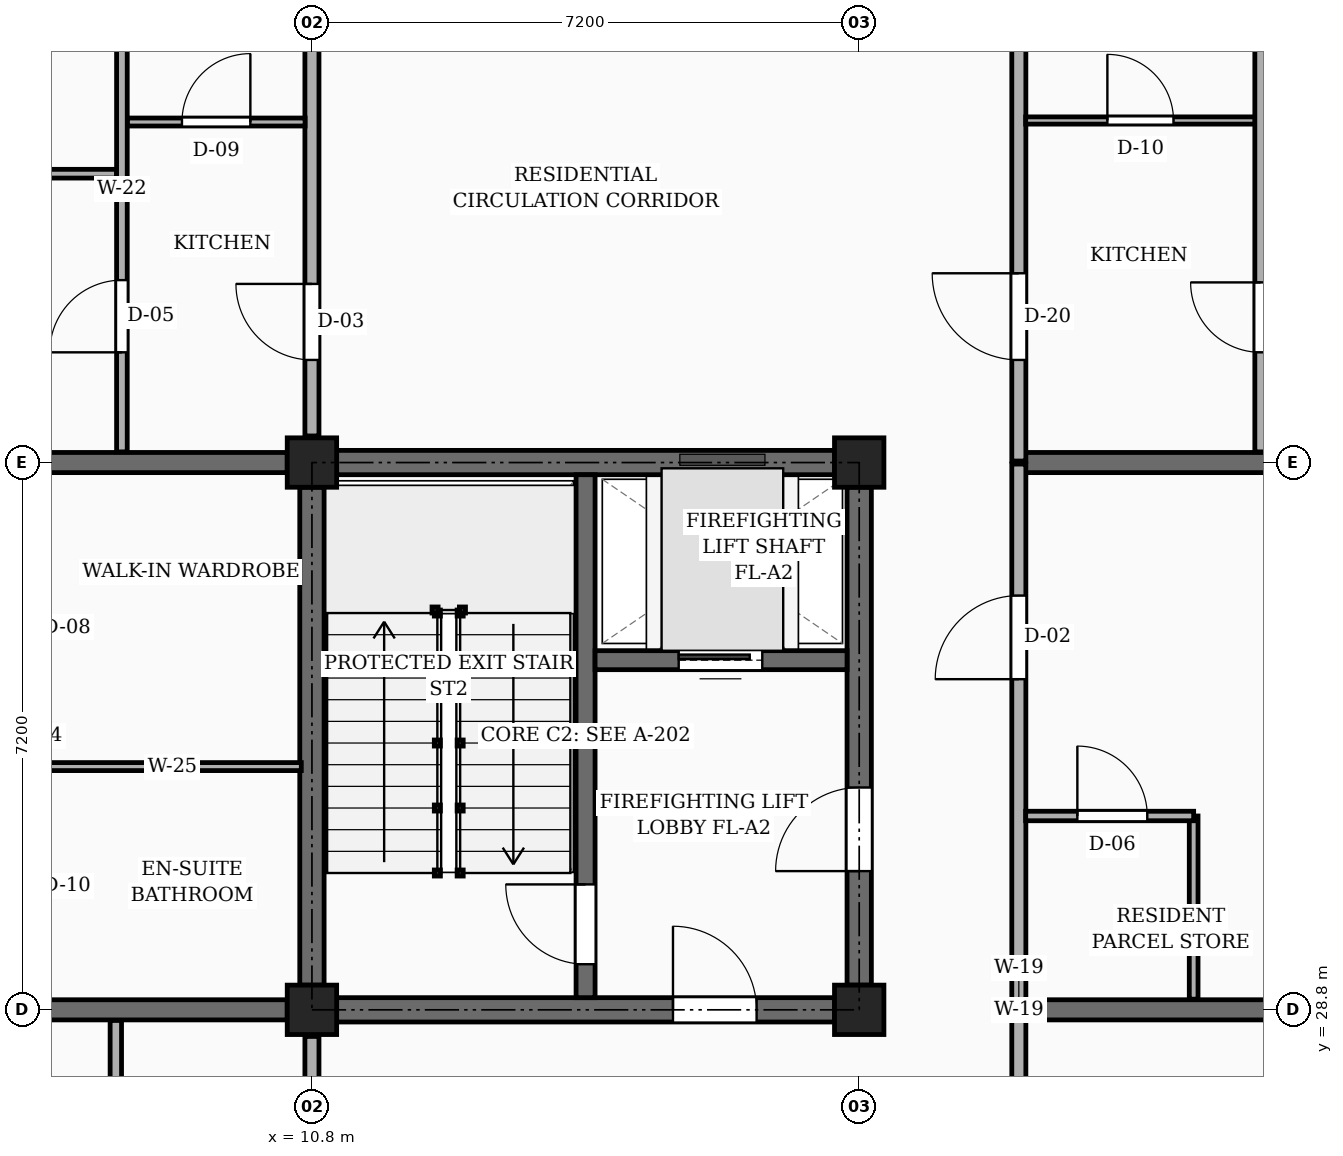
"""IFC4 building model, lengths in metres.
Left out: names, types, materials, properties, quantities, classifications, styles, units other than length and angle.
Written with IfcOpenShell. Run it as: python <this file> out.ifc"""

import sys

from ifc_helpers import new_model, si_unit, direction, frame, frame_2d, origin, origin_2d, place, context, subcontext, project, spatial, rectangle, extrude, element, fill, save


model = new_model("IFC4")
c1 = context("Model", 3, precision=1e-05, world=origin(), true_north=direction((0.0, 1.0)))
c2 = subcontext(c1, "Body", "Model", "MODEL_VIEW")
j1 = project(units=[si_unit("LENGTHUNIT", "METRE"), si_unit("PLANEANGLEUNIT", "RADIAN")], contexts=[c1])
p1 = place(None, origin())
s1 = spatial("IfcSite", under=j1, at=p1, CompositionType="ELEMENT")
p2 = place(p1, origin())
s2 = spatial("IfcBuilding", under=s1, at=p2, CompositionType="ELEMENT")
p3 = place(p2, origin())
s3 = spatial("IfcBuildingStorey", under=s2, at=p3, CompositionType="ELEMENT", Elevation=0.0)
for number, where, z_axis, x_axis in (
    (1, (10.8, 28.8, 0.0), (0.0, 0.0, 1.0), (1.0, 0.0, 0.0)),
    (2, (10.8, 36.0, 0.0), (0.0, 0.0, 1.0), (1.0, 0.0, 0.0)),
    (3, (18.0, 28.8, 0.0), (0.0, 0.0, 1.0), (1.0, 0.0, 0.0)),
    (4, (18.0, 36.0, 0.0), (0.0, 0.0, 1.0), (1.0, 0.0, 0.0)),
):
    element("IfcColumn", number, at=place(p3, frame(where, z_axis=z_axis, x_axis=x_axis)), inside=s3, PredefinedType="COLUMN", context=c2, shape_type="SweptSolid", body=[
        extrude(rectangle(XDim=0.65, YDim=0.65, at=origin_2d()), origin(), (0.0, 0.0, 1.0), 4.5),
    ])
p4 = place(p3, frame((3.9, 28.8, 0.0), z_axis=(0.0, 0.0, 1.0), x_axis=(1.0, 0.0, 0.0)))
e5 = element("IfcWall", 5, at=p4, inside=s3, PredefinedType="SOLIDWALL", context=c2, shape_type="SweptSolid", body=[
    extrude(rectangle(XDim=6.575, YDim=0.265, at=frame_2d((3.288, 0.0))), origin(), (0.0, 0.0, 1.0), 3.52),
])
p5 = place(p4, frame((1.35, 0.0, 0.0)))
e6 = element("IfcOpeningElement", 6, at=p5, cuts=e5, PredefinedType="OPENING", context=c2, shape_type="SweptSolid", body=[
    extrude(rectangle(XDim=0.98, YDim=2.12, at=frame_2d((0.49, 1.06))), frame((0.0, 0.143, 0.0), z_axis=(0.0, -1.0, 0.0), x_axis=(1.0, 0.0, 0.0)), (0.0, 0.0, 1.0), 0.285),
])
p6 = place(p3, frame((20.1, 28.8, 0.0), z_axis=(0.0, 0.0, 1.0), x_axis=(1.0, 0.0, 0.0)))
e7 = element("IfcWall", 7, at=p6, inside=s3, PredefinedType="SOLIDWALL", context=c2, shape_type="SweptSolid", body=[
    extrude(rectangle(XDim=12.0, YDim=0.265, at=frame_2d((6.0, 0.0))), origin(), (0.0, 0.0, 1.0), 3.52),
])
p7 = place(p3, frame((3.9, 36.0, 0.0), z_axis=(0.0, 0.0, 1.0), x_axis=(1.0, 0.0, 0.0)))
e8 = element("IfcWall", 8, at=p7, inside=s3, PredefinedType="SOLIDWALL", context=c2, shape_type="SweptSolid", body=[
    extrude(rectangle(XDim=6.575, YDim=0.265, at=frame_2d((3.288, 0.0))), origin(), (0.0, 0.0, 1.0), 3.52),
])
p8 = place(p3, frame((20.1, 36.0, 0.0), z_axis=(0.0, 0.0, 1.0), x_axis=(1.0, 0.0, 0.0)))
e9 = element("IfcWall", 9, at=p8, inside=s3, PredefinedType="SOLIDWALL", context=c2, shape_type="SweptSolid", body=[
    extrude(rectangle(XDim=12.0, YDim=0.265, at=frame_2d((6.0, 0.0))), origin(), (0.0, 0.0, 1.0), 3.52),
])
for number, where, z_axis, x_axis in (
    (10, (10.8, 29.125, 0.0), (0.0, 0.0, 1.0), (0.0, 1.0, 0.0)),
    (11, (11.125, 36.0, 0.0), (0.0, 0.0, 1.0), (1.0, 0.0, 0.0)),
):
    element("IfcWall", number, at=place(p3, frame(where, z_axis=z_axis, x_axis=x_axis)), inside=s3, PredefinedType="SHEAR", context=c2, shape_type="SweptSolid", body=[
        extrude(rectangle(XDim=6.55, YDim=0.32, at=frame_2d((3.275, 0.0))), origin(), (0.0, 0.0, 1.0), 4.22),
    ])
p9 = place(p3, frame((18.0, 29.125, 0.0), z_axis=(0.0, 0.0, 1.0), x_axis=(0.0, 1.0, 0.0)))
e12 = element("IfcWall", 12, at=p9, inside=s3, PredefinedType="SHEAR", context=c2, shape_type="SweptSolid", body=[
    extrude(rectangle(XDim=6.55, YDim=0.32, at=frame_2d((3.275, 0.0))), origin(), (0.0, 0.0, 1.0), 4.22),
])
p10 = place(p9, frame((1.5, 0.0, 0.0)))
e13 = element("IfcOpeningElement", 13, at=p10, cuts=e12, PredefinedType="OPENING", context=c2, shape_type="SweptSolid", body=[
    extrude(rectangle(XDim=1.1, YDim=2.15, at=frame_2d((0.55, 1.075))), frame((0.0, 0.17, 0.0), z_axis=(0.0, -1.0, 0.0), x_axis=(1.0, 0.0, 0.0)), (0.0, 0.0, 1.0), 0.34),
])
p11 = place(p3, frame((11.125, 28.8, 0.0), z_axis=(0.0, 0.0, 1.0), x_axis=(1.0, 0.0, 0.0)))
e14 = element("IfcWall", 14, at=p11, inside=s3, PredefinedType="SHEAR", context=c2, shape_type="SweptSolid", body=[
    extrude(rectangle(XDim=6.55, YDim=0.32, at=frame_2d((3.275, 0.0))), origin(), (0.0, 0.0, 1.0), 4.22),
])
p12 = place(p11, frame((4.425, 0.0, 0.0)))
e15 = element("IfcOpeningElement", 15, at=p12, cuts=e14, PredefinedType="OPENING", context=c2, shape_type="SweptSolid", body=[
    extrude(rectangle(XDim=1.1, YDim=2.15, at=frame_2d((0.55, 1.075))), frame((0.0, 0.17, 0.0), z_axis=(0.0, -1.0, 0.0), x_axis=(1.0, 0.0, 0.0)), (0.0, 0.0, 1.0), 0.34),
])
p13 = place(p3, frame((14.4, 28.96, 0.0), z_axis=(0.0, 0.0, 1.0), x_axis=(0.0, 1.0, 0.0)))
e16 = element("IfcWall", 16, at=p13, inside=s3, PredefinedType="SHEAR", context=c2, shape_type="SweptSolid", body=[
    extrude(rectangle(XDim=6.88, YDim=0.25, at=frame_2d((3.44, 0.0))), origin(), (0.0, 0.0, 1.0), 4.22),
])
p14 = place(p13, frame((0.44, 0.0, 0.0)))
e17 = element("IfcOpeningElement", 17, at=p14, cuts=e16, PredefinedType="OPENING", context=c2, shape_type="SweptSolid", body=[
    extrude(rectangle(XDim=1.05, YDim=2.15, at=frame_2d((0.525, 1.075))), frame((0.0, 0.135, 0.0), z_axis=(0.0, -1.0, 0.0), x_axis=(1.0, 0.0, 0.0)), (0.0, 0.0, 1.0), 0.27),
])
p15 = place(p3, frame((14.525, 33.4, 0.0), z_axis=(0.0, 0.0, 1.0), x_axis=(1.0, 0.0, 0.0)))
e18 = element("IfcWall", 18, at=p15, inside=s3, PredefinedType="SHEAR", context=c2, shape_type="SweptSolid", body=[
    extrude(rectangle(XDim=3.315, YDim=0.25, at=frame_2d((1.658, 0.0))), origin(), (0.0, 0.0, 1.0), 4.22),
])
p16 = place(p15, frame((1.1, 0.0, 0.0)))
e19 = element("IfcOpeningElement", 19, at=p16, cuts=e18, PredefinedType="OPENING", context=c2, shape_type="SweptSolid", body=[
    extrude(rectangle(XDim=1.1, YDim=2.2, at=frame_2d((0.55, 1.1))), frame((0.0, 0.135, 0.0), z_axis=(0.0, -1.0, 0.0), x_axis=(1.0, 0.0, 0.0)), (0.0, 0.0, 1.0), 0.27),
])
p17 = place(p3, frame((20.1, 21.62, 0.0), z_axis=(0.0, 0.0, 1.0), x_axis=(0.0, 1.0, 0.0)))
e20 = element("IfcWall", 20, at=p17, inside=s3, PredefinedType="PARTITIONING", context=c2, shape_type="SweptSolid", body=[
    extrude(rectangle(XDim=7.16, YDim=0.185, at=frame_2d((3.58, 0.0))), origin(), (0.0, 0.0, 1.0), 3.655),
])
p18 = place(p17, frame((1.78, 0.0, 0.0)))
e21 = element("IfcOpeningElement", 21, at=p18, cuts=e20, PredefinedType="OPENING", context=c2, shape_type="SweptSolid", body=[
    extrude(rectangle(XDim=1.1, YDim=2.15, at=frame_2d((0.55, 1.075))), frame((0.0, 0.103, 0.0), z_axis=(0.0, -1.0, 0.0), x_axis=(1.0, 0.0, 0.0)), (0.0, 0.0, 1.0), 0.205),
])
p19 = place(p3, frame((20.1, 28.82, 0.0), z_axis=(0.0, 0.0, 1.0), x_axis=(0.0, 1.0, 0.0)))
e22 = element("IfcWall", 22, at=p19, inside=s3, PredefinedType="PARTITIONING", context=c2, shape_type="SweptSolid", body=[
    extrude(rectangle(XDim=7.16, YDim=0.185, at=frame_2d((3.58, 0.0))), origin(), (0.0, 0.0, 1.0), 3.655),
])
p20 = place(p19, frame((4.33, 0.0, 0.0)))
e23 = element("IfcOpeningElement", 23, at=p20, cuts=e22, PredefinedType="OPENING", context=c2, shape_type="SweptSolid", body=[
    extrude(rectangle(XDim=1.1, YDim=2.15, at=frame_2d((0.55, 1.075))), frame((0.0, 0.103, 0.0), z_axis=(0.0, -1.0, 0.0), x_axis=(1.0, 0.0, 0.0)), (0.0, 0.0, 1.0), 0.205),
])
p21 = place(p3, frame((20.1, 36.02, 0.0), z_axis=(0.0, 0.0, 1.0), x_axis=(0.0, 1.0, 0.0)))
e24 = element("IfcWall", 24, at=p21, inside=s3, PredefinedType="PARTITIONING", context=c2, shape_type="SweptSolid", body=[
    extrude(rectangle(XDim=7.16, YDim=0.185, at=frame_2d((3.58, 0.0))), origin(), (0.0, 0.0, 1.0), 3.655),
])
p22 = place(p21, frame((1.33, 0.0, 0.0)))
e25 = element("IfcOpeningElement", 25, at=p22, cuts=e24, PredefinedType="OPENING", context=c2, shape_type="SweptSolid", body=[
    extrude(rectangle(XDim=1.14, YDim=2.18, at=frame_2d((0.57, 1.09))), frame((0.0, 0.103, 0.0), z_axis=(0.0, -1.0, 0.0), x_axis=(1.0, 0.0, 0.0)), (0.0, 0.0, 1.0), 0.205),
])
p23 = place(p3, frame((10.8, 21.95, 0.0), z_axis=(0.0, 0.0, 1.0), x_axis=(0.0, 1.0, 0.0)))
e26 = element("IfcWall", 26, at=p23, inside=s3, PredefinedType="PARTITIONING", context=c2, shape_type="SweptSolid", body=[
    extrude(rectangle(XDim=6.5, YDim=0.185, at=frame_2d((3.25, 0.0))), origin(), (0.0, 0.0, 1.0), 3.47),
])
p24 = place(p23, frame((1.0, 0.0, 0.0)))
e27 = element("IfcOpeningElement", 27, at=p24, cuts=e26, PredefinedType="OPENING", context=c2, shape_type="SweptSolid", body=[
    extrude(rectangle(XDim=1.14, YDim=2.18, at=frame_2d((0.57, 1.09))), frame((0.0, 0.103, 0.0), z_axis=(0.0, -1.0, 0.0), x_axis=(1.0, 0.0, 0.0)), (0.0, 0.0, 1.0), 0.205),
])
p25 = place(p3, frame((10.8, 36.35, 0.0), z_axis=(0.0, 0.0, 1.0), x_axis=(0.0, 1.0, 0.0)))
e28 = element("IfcWall", 28, at=p25, inside=s3, PredefinedType="PARTITIONING", context=c2, shape_type="SweptSolid", body=[
    extrude(rectangle(XDim=6.5, YDim=0.185, at=frame_2d((3.25, 0.0))), origin(), (0.0, 0.0, 1.0), 3.47),
])
p26 = place(p25, frame((1.0, 0.0, 0.0)))
e29 = element("IfcOpeningElement", 29, at=p26, cuts=e28, PredefinedType="OPENING", context=c2, shape_type="SweptSolid", body=[
    extrude(rectangle(XDim=1.0, YDim=2.15, at=frame_2d((0.5, 1.075))), frame((0.0, 0.103, 0.0), z_axis=(0.0, -1.0, 0.0), x_axis=(1.0, 0.0, 0.0)), (0.0, 0.0, 1.0), 0.205),
])
p27 = place(p3, frame((8.22, 21.74, 0.0), z_axis=(0.0, 0.0, 1.0), x_axis=(0.0, 1.0, 0.0)))
e30 = element("IfcWall", 30, at=p27, inside=s3, PredefinedType="PARTITIONING", context=c2, shape_type="SweptSolid", body=[
    extrude(rectangle(XDim=6.92, YDim=0.15, at=frame_2d((3.46, 0.0))), origin(), (0.0, 0.0, 1.0), 3.655),
])
p28 = place(p27, frame((1.31, 0.0, 0.0)))
e31 = element("IfcOpeningElement", 31, at=p28, cuts=e30, PredefinedType="OPENING", context=c2, shape_type="SweptSolid", body=[
    extrude(rectangle(XDim=0.95, YDim=2.1, at=frame_2d((0.475, 1.05))), frame((0.0, 0.085, 0.0), z_axis=(0.0, -1.0, 0.0), x_axis=(1.0, 0.0, 0.0)), (0.0, 0.0, 1.0), 0.17),
])
p29 = place(p3, frame((7.27, 32.0, 0.0), z_axis=(0.0, 0.0, 1.0), x_axis=(1.0, 0.0, 0.0)))
e32 = element("IfcWall", 32, at=p29, inside=s3, PredefinedType="PARTITIONING", context=c2, shape_type="SweptSolid", body=[
    extrude(rectangle(XDim=3.39, YDim=0.105, at=frame_2d((1.695, 0.0))), origin(), (0.0, 0.0, 1.0), 3.655),
])
p30 = place(p3, frame((22.4, 28.94, 0.0), z_axis=(0.0, 0.0, 1.0), x_axis=(0.0, 1.0, 0.0)))
e33 = element("IfcWall", 33, at=p30, inside=s3, PredefinedType="PARTITIONING", context=c2, shape_type="SweptSolid", body=[
    extrude(rectangle(XDim=2.41, YDim=0.115, at=frame_2d((1.205, 0.0))), origin(), (0.0, 0.0, 1.0), 3.655),
])
p31 = place(p3, frame((20.19, 31.35, 0.0), z_axis=(0.0, 0.0, 1.0), x_axis=(1.0, 0.0, 0.0)))
e34 = element("IfcWall", 34, at=p31, inside=s3, PredefinedType="PARTITIONING", context=c2, shape_type="SweptSolid", body=[
    extrude(rectangle(XDim=2.21, YDim=0.125, at=frame_2d((1.105, 0.0))), origin(), (0.0, 0.0, 1.0), 3.655),
])
p32 = place(p31, frame((0.68, 0.0, 0.0)))
e35 = element("IfcOpeningElement", 35, at=p32, cuts=e34, PredefinedType="OPENING", context=c2, shape_type="SweptSolid", body=[
    extrude(rectangle(XDim=0.92, YDim=2.1, at=frame_2d((0.46, 1.05))), frame((0.0, 0.073, 0.0), z_axis=(0.0, -1.0, 0.0), x_axis=(1.0, 0.0, 0.0)), (0.0, 0.0, 1.0), 0.145),
])
p33 = place(p3, frame((3.775, 39.8, 0.0), z_axis=(0.0, 0.0, 1.0), x_axis=(1.0, 0.0, 0.0)))
e36 = element("IfcWall", 36, at=p33, inside=s3, PredefinedType="PARTITIONING", context=c2, shape_type="SweptSolid", body=[
    extrude(rectangle(XDim=4.455, YDim=0.115, at=frame_2d((2.228, 0.0))), origin(), (0.0, 0.0, 1.0), 3.655),
])
p34 = place(p33, frame((1.778, 0.0, 0.0)))
e37 = element("IfcOpeningElement", 37, at=p34, cuts=e36, PredefinedType="OPENING", context=c2, shape_type="SweptSolid", body=[
    extrude(rectangle(XDim=0.9, YDim=2.1, at=frame_2d((0.45, 1.05))), frame((0.0, 0.067, 0.0), z_axis=(0.0, -1.0, 0.0), x_axis=(1.0, 0.0, 0.0)), (0.0, 0.0, 1.0), 0.135),
])
p35 = place(p3, frame((8.37, 40.48, 0.0), z_axis=(0.0, 0.0, 1.0), x_axis=(1.0, 0.0, 0.0)))
e38 = element("IfcWall", 38, at=p35, inside=s3, PredefinedType="PARTITIONING", context=c2, shape_type="SweptSolid", body=[
    extrude(rectangle(XDim=2.34, YDim=0.105, at=frame_2d((1.17, 0.0))), origin(), (0.0, 0.0, 1.0), 3.655),
])
p36 = place(p35, frame((0.72, 0.0, 0.0)))
e39 = element("IfcOpeningElement", 39, at=p36, cuts=e38, PredefinedType="OPENING", context=c2, shape_type="SweptSolid", body=[
    extrude(rectangle(XDim=0.9, YDim=2.05, at=frame_2d((0.45, 1.025))), frame((0.0, 0.062, 0.0), z_axis=(0.0, -1.0, 0.0), x_axis=(1.0, 0.0, 0.0)), (0.0, 0.0, 1.0), 0.125),
])
p37 = place(p3, frame((8.3, 36.14, 0.0), z_axis=(0.0, 0.0, 1.0), x_axis=(0.0, 1.0, 0.0)))
e40 = element("IfcWall", 40, at=p37, inside=s3, PredefinedType="PARTITIONING", context=c2, shape_type="SweptSolid", body=[
    extrude(rectangle(XDim=6.92, YDim=0.14, at=frame_2d((3.46, 0.0))), origin(), (0.0, 0.0, 1.0), 3.655),
])
p38 = place(p37, frame((1.31, 0.0, 0.0)))
e41 = element("IfcOpeningElement", 41, at=p38, cuts=e40, PredefinedType="OPENING", context=c2, shape_type="SweptSolid", body=[
    extrude(rectangle(XDim=0.95, YDim=2.1, at=frame_2d((0.475, 1.05))), frame((0.0, 0.08, 0.0), z_axis=(0.0, -1.0, 0.0), x_axis=(1.0, 0.0, 0.0)), (0.0, 0.0, 1.0), 0.16),
])
p39 = place(p3, frame((20.19, 40.5, 0.0), z_axis=(0.0, 0.0, 1.0), x_axis=(1.0, 0.0, 0.0)))
e42 = element("IfcWall", 42, at=p39, inside=s3, PredefinedType="PARTITIONING", context=c2, shape_type="SweptSolid", body=[
    extrude(rectangle(XDim=3.02, YDim=0.095, at=frame_2d((1.51, 0.0))), origin(), (0.0, 0.0, 1.0), 3.655),
])
p40 = place(p39, frame((1.075, 0.0, 0.0)))
e43 = element("IfcOpeningElement", 43, at=p40, cuts=e42, PredefinedType="OPENING", context=c2, shape_type="SweptSolid", body=[
    extrude(rectangle(XDim=0.87, YDim=2.05, at=frame_2d((0.435, 1.025))), frame((0.0, 0.058, 0.0), z_axis=(0.0, -1.0, 0.0), x_axis=(1.0, 0.0, 0.0)), (0.0, 0.0, 1.0), 0.115),
])
p41 = place(p3, frame((23.28, 36.14, 0.0), z_axis=(0.0, 0.0, 1.0), x_axis=(0.0, 1.0, 0.0)))
e44 = element("IfcWall", 44, at=p41, inside=s3, PredefinedType="PARTITIONING", context=c2, shape_type="SweptSolid", body=[
    extrude(rectangle(XDim=6.92, YDim=0.15, at=frame_2d((3.46, 0.0))), origin(), (0.0, 0.0, 1.0), 3.655),
])
p42 = place(p41, frame((1.31, 0.0, 0.0)))
e45 = element("IfcOpeningElement", 45, at=p42, cuts=e44, PredefinedType="OPENING", context=c2, shape_type="SweptSolid", body=[
    extrude(rectangle(XDim=0.92, YDim=2.1, at=frame_2d((0.46, 1.05))), frame((0.0, 0.085, 0.0), z_axis=(0.0, -1.0, 0.0), x_axis=(1.0, 0.0, 0.0)), (0.0, 0.0, 1.0), 0.17),
])
p43 = place(p10, frame((1.1, 0.0, 0.0), z_axis=(0.0, 0.0, 1.0), x_axis=(-1.0, 0.0, 0.0)))
e46 = element("IfcDoor", 46, at=p43, inside=s3, OperationType="SINGLE_SWING_LEFT", PredefinedType="DOOR", context=c2, shape_type="SweptSolid", body=[
    extrude(rectangle(XDim=1.1, YDim=2.15, at=frame_2d((0.55, 1.075))), frame((0.0, 0.025, 0.0), z_axis=(0.0, -1.0, 0.0), x_axis=(1.0, 0.0, 0.0)), (0.0, 0.0, 1.0), 0.05),
])
fill(e13, e46)
p44 = place(p12, frame((1.1, 0.0, 0.0), z_axis=(0.0, 0.0, 1.0), x_axis=(-1.0, 0.0, 0.0)))
e47 = element("IfcDoor", 47, at=p44, inside=s3, OperationType="SINGLE_SWING_LEFT", PredefinedType="DOOR", context=c2, shape_type="SweptSolid", body=[
    extrude(rectangle(XDim=1.1, YDim=2.15, at=frame_2d((0.55, 1.075))), frame((0.0, 0.025, 0.0), z_axis=(0.0, -1.0, 0.0), x_axis=(1.0, 0.0, 0.0)), (0.0, 0.0, 1.0), 0.05),
])
fill(e15, e47)
p45 = place(p14, frame((1.05, 0.0, 0.0), z_axis=(0.0, 0.0, 1.0), x_axis=(-1.0, 0.0, 0.0)))
e48 = element("IfcDoor", 48, at=p45, inside=s3, OperationType="SINGLE_SWING_RIGHT", PredefinedType="DOOR", context=c2, shape_type="SweptSolid", body=[
    extrude(rectangle(XDim=1.05, YDim=2.15, at=frame_2d((0.525, 1.075))), frame((0.0, 0.025, 0.0), z_axis=(0.0, -1.0, 0.0), x_axis=(1.0, 0.0, 0.0)), (0.0, 0.0, 1.0), 0.05),
])
fill(e17, e48)
p46 = place(p16, origin())
e49 = element("IfcDoor", 49, at=p46, inside=s3, OperationType="SLIDING_TO_LEFT", PredefinedType="DOOR", context=c2, shape_type="SweptSolid", body=[
    extrude(rectangle(XDim=1.1, YDim=2.2, at=frame_2d((0.55, 1.1))), frame((0.0, 0.025, 0.0), z_axis=(0.0, -1.0, 0.0), x_axis=(1.0, 0.0, 0.0)), (0.0, 0.0, 1.0), 0.05),
])
fill(e19, e49)
p47 = place(p20, origin())
e50 = element("IfcDoor", 50, at=p47, inside=s3, OperationType="SINGLE_SWING_LEFT", PredefinedType="DOOR", context=c2, shape_type="SweptSolid", body=[
    extrude(rectangle(XDim=1.1, YDim=2.15, at=frame_2d((0.55, 1.075))), frame((0.0, 0.025, 0.0), z_axis=(0.0, -1.0, 0.0), x_axis=(1.0, 0.0, 0.0)), (0.0, 0.0, 1.0), 0.05),
])
fill(e23, e50)
p48 = place(p22, origin())
e51 = element("IfcDoor", 51, at=p48, inside=s3, OperationType="SINGLE_SWING_RIGHT", PredefinedType="DOOR", context=c2, shape_type="SweptSolid", body=[
    extrude(rectangle(XDim=1.14, YDim=2.18, at=frame_2d((0.57, 1.09))), frame((0.0, 0.025, 0.0), z_axis=(0.0, -1.0, 0.0), x_axis=(1.0, 0.0, 0.0)), (0.0, 0.0, 1.0), 0.05),
])
fill(e25, e51)
p49 = place(p26, origin())
e52 = element("IfcDoor", 52, at=p49, inside=s3, OperationType="SINGLE_SWING_RIGHT", PredefinedType="DOOR", context=c2, shape_type="SweptSolid", body=[
    extrude(rectangle(XDim=1.0, YDim=2.15, at=frame_2d((0.5, 1.075))), frame((0.0, 0.025, 0.0), z_axis=(0.0, -1.0, 0.0), x_axis=(1.0, 0.0, 0.0)), (0.0, 0.0, 1.0), 0.05),
])
fill(e29, e52)
p50 = place(p32, origin())
e53 = element("IfcDoor", 53, at=p50, inside=s3, OperationType="SINGLE_SWING_LEFT", PredefinedType="DOOR", context=c2, shape_type="SweptSolid", body=[
    extrude(rectangle(XDim=0.92, YDim=2.1, at=frame_2d((0.46, 1.05))), frame((0.0, 0.025, 0.0), z_axis=(0.0, -1.0, 0.0), x_axis=(1.0, 0.0, 0.0)), (0.0, 0.0, 1.0), 0.05),
])
fill(e35, e53)
p51 = place(p36, origin())
e54 = element("IfcDoor", 54, at=p51, inside=s3, OperationType="SINGLE_SWING_RIGHT", PredefinedType="DOOR", context=c2, shape_type="SweptSolid", body=[
    extrude(rectangle(XDim=0.9, YDim=2.05, at=frame_2d((0.45, 1.025))), frame((0.0, 0.025, 0.0), z_axis=(0.0, -1.0, 0.0), x_axis=(1.0, 0.0, 0.0)), (0.0, 0.0, 1.0), 0.05),
])
fill(e39, e54)
p52 = place(p38, origin())
e55 = element("IfcDoor", 55, at=p52, inside=s3, OperationType="SINGLE_SWING_LEFT", PredefinedType="DOOR", context=c2, shape_type="SweptSolid", body=[
    extrude(rectangle(XDim=0.95, YDim=2.1, at=frame_2d((0.475, 1.05))), frame((0.0, 0.025, 0.0), z_axis=(0.0, -1.0, 0.0), x_axis=(1.0, 0.0, 0.0)), (0.0, 0.0, 1.0), 0.05),
])
fill(e41, e55)
p53 = place(p40, origin())
e56 = element("IfcDoor", 56, at=p53, inside=s3, OperationType="SINGLE_SWING_LEFT", PredefinedType="DOOR", context=c2, shape_type="SweptSolid", body=[
    extrude(rectangle(XDim=0.87, YDim=2.05, at=frame_2d((0.435, 1.025))), frame((0.0, 0.025, 0.0), z_axis=(0.0, -1.0, 0.0), x_axis=(1.0, 0.0, 0.0)), (0.0, 0.0, 1.0), 0.05),
])
fill(e43, e56)
p54 = place(p42, origin())
e57 = element("IfcDoor", 57, at=p54, inside=s3, OperationType="SINGLE_SWING_RIGHT", PredefinedType="DOOR", context=c2, shape_type="SweptSolid", body=[
    extrude(rectangle(XDim=0.92, YDim=2.1, at=frame_2d((0.46, 1.05))), frame((0.0, 0.025, 0.0), z_axis=(0.0, -1.0, 0.0), x_axis=(1.0, 0.0, 0.0)), (0.0, 0.0, 1.0), 0.05),
])
fill(e45, e57)
save(model, sys.argv[1])
